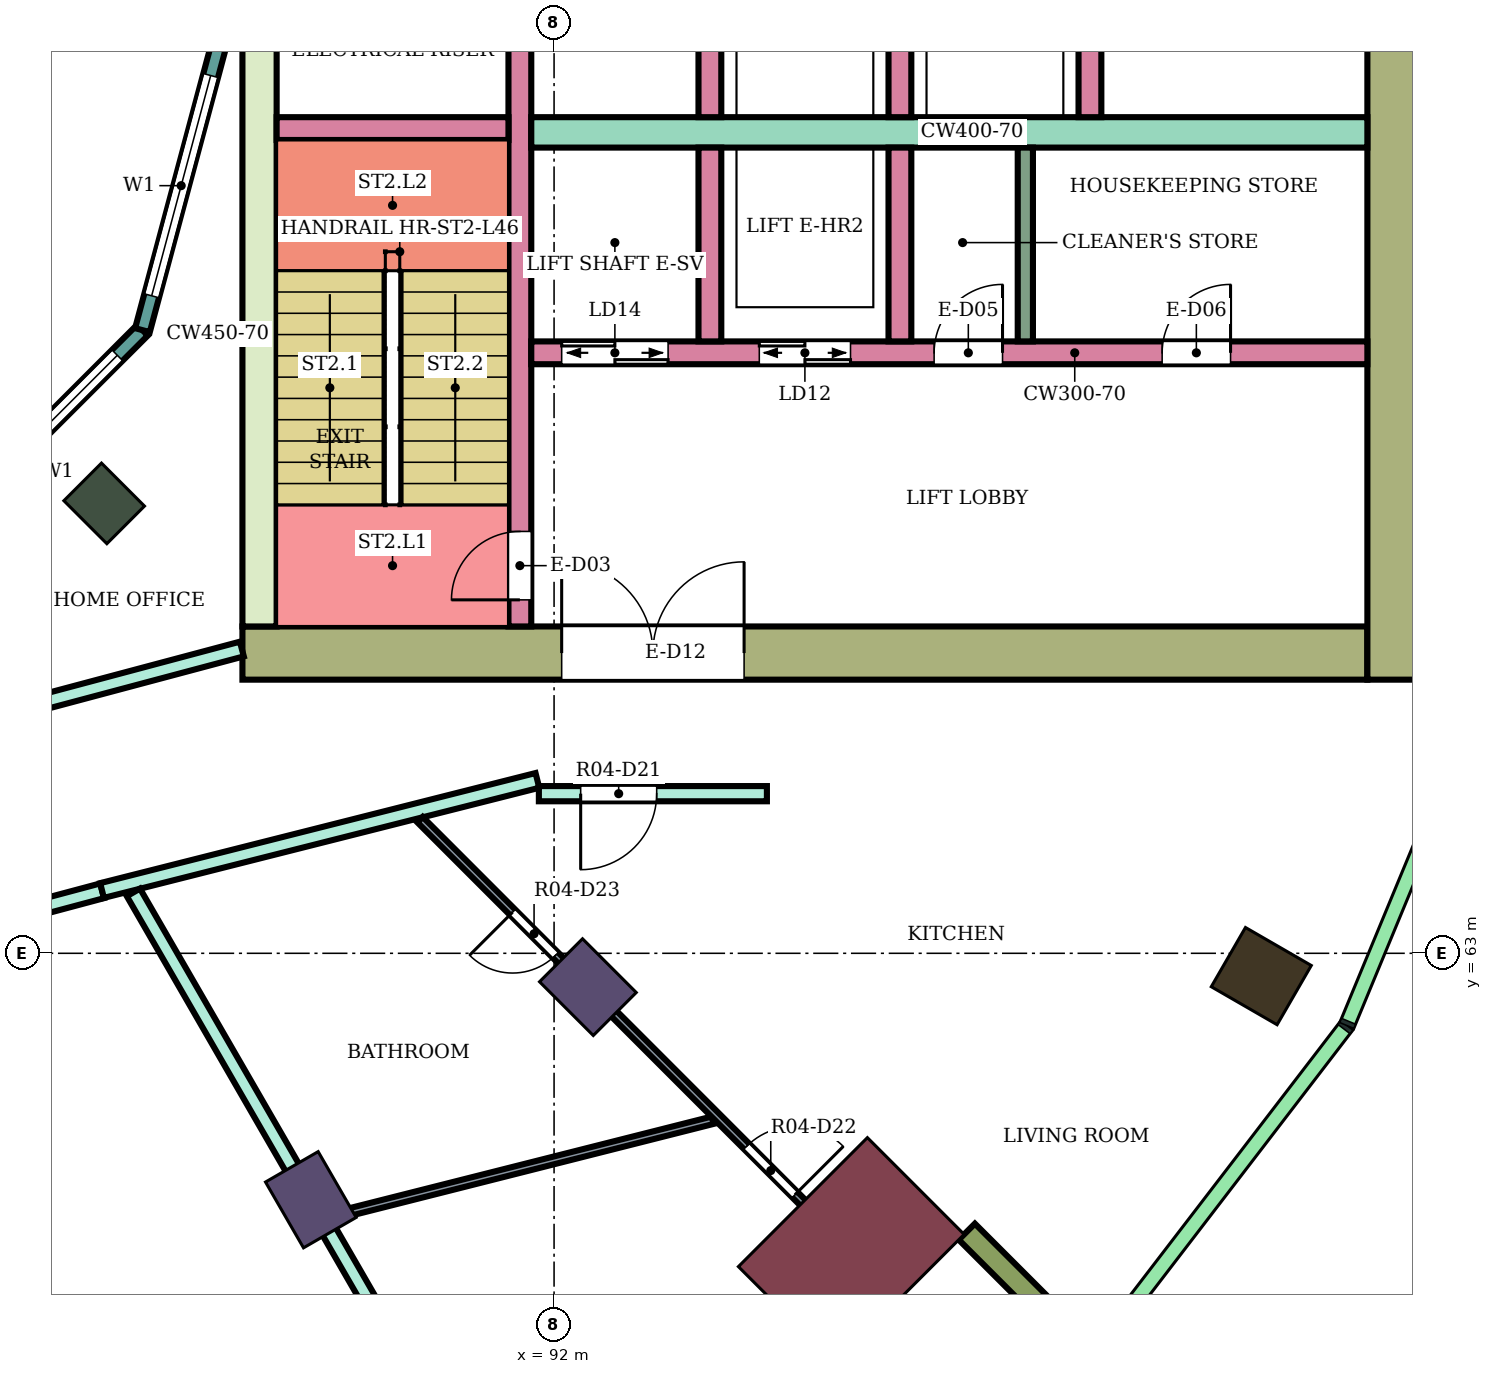
"""IFC4 building model, lengths in metres.
Left out: names, types, materials, properties, quantities, classifications, styles, units other than length and angle.
Written with IfcOpenShell. Run it as: python <this file> out.ifc"""

import sys

from ifc_helpers import new_model, si_unit, direction, frame, frame_2d, origin, origin_2d, place, context, subcontext, project, spatial, rectangle, extrude, element, fill, save


model = new_model("IFC4")
c1 = context("Model", 3, precision=1e-05, world=origin(), true_north=direction((0.0, 1.0)))
c2 = subcontext(c1, "Body", "Model", "MODEL_VIEW")
j1 = project(units=[si_unit("LENGTHUNIT", "METRE"), si_unit("PLANEANGLEUNIT", "RADIAN")], contexts=[c1])
p1 = place(None, origin())
s1 = spatial("IfcSite", under=j1, at=p1, CompositionType="ELEMENT")
p2 = place(p1, origin())
s2 = spatial("IfcBuilding", under=s1, at=p2, CompositionType="ELEMENT")
p3 = place(p2, frame((0.0, 0.0, 198.7)))
s3 = spatial("IfcBuildingStorey", under=s2, at=p3, CompositionType="ELEMENT", Elevation=198.7)
p4 = place(p3, frame((101.304, 62.7, 0.0), z_axis=(0.0, 0.0, 1.0), x_axis=(0.866025403784, -0.5, 0.0)))
e1 = element("IfcColumn", 1, at=p4, inside=s3, PredefinedType="COLUMN", context=c2, shape_type="SweptSolid", body=[
    extrude(rectangle(XDim=1.0, YDim=0.9, at=origin_2d()), origin(), (0.0, 0.0, 1.0), 4.1),
])
for number, where, z_axis, x_axis in (
    (2, (88.8, 59.758, 0.0), (0.0, 0.0, 1.0), (0.5, -0.866, 0.0)),
    (3, (92.445, 62.555, 0.0), (0.0, 0.0, 1.0), (0.707, -0.707, 0.0)),
):
    element("IfcColumn", number, at=place(p3, frame(where, z_axis=z_axis, x_axis=x_axis)), inside=s3, PredefinedType="COLUMN", context=c2, shape_type="SweptSolid", body=[
        extrude(rectangle(XDim=1.0, YDim=0.8, at=origin_2d()), origin(), (0.0, 0.0, 1.0), 4.1),
    ])
p5 = place(p3, frame((86.081, 68.919, 0.0), z_axis=(0.0, 0.0, 1.0), x_axis=(0.707106781187, -0.707106781187, 0.0)))
e4 = element("IfcColumn", 4, at=p5, inside=s3, PredefinedType="COLUMN", context=c2, shape_type="SweptSolid", body=[
    extrude(rectangle(XDim=0.8, YDim=0.7, at=origin_2d()), origin(), (0.0, 0.0, 1.0), 4.1),
])
p6 = place(p3, frame((95.91, 59.09, 0.0), z_axis=(0.0, 0.0, 1.0), x_axis=(0.707106781187, -0.707106781187, 0.0)))
e5 = element("IfcColumn", 5, at=p6, inside=s3, PredefinedType="COLUMN", context=c2, shape_type="SweptSolid", body=[
    extrude(rectangle(XDim=1.8, YDim=2.4, at=origin_2d()), origin(), (0.0, 0.0, 1.0), 4.1),
])
p7 = place(p3, frame((87.9, 66.95, 0.0), z_axis=(0.0, 0.0, 1.0), x_axis=(1.0, 0.0, 0.0)))
e6 = element("IfcWall", 6, at=p7, inside=s3, PredefinedType="SHEAR", context=c2, shape_type="SweptSolid", body=[
    extrude(rectangle(XDim=14.8, YDim=0.7, at=frame_2d((7.4, 0.0))), origin(), (0.0, 0.0, 1.0), 3.78),
])
p8 = place(p7, frame((4.2, 0.0, 0.0)))
e7 = element("IfcOpeningElement", 7, at=p8, cuts=e6, PredefinedType="OPENING", context=c2, shape_type="SweptSolid", body=[
    extrude(rectangle(XDim=2.4, YDim=2.4, at=frame_2d((1.2, 1.2))), frame((0.0, 0.36, 0.0), z_axis=(0.0, -1.0, 0.0), x_axis=(1.0, 0.0, 0.0)), (0.0, 0.0, 1.0), 0.72),
])
p9 = place(p3, frame((88.125, 67.3, 0.0), z_axis=(0.0, 0.0, 1.0), x_axis=(0.0, 1.0, 0.0)))
e8 = element("IfcWall", 8, at=p9, inside=s3, PredefinedType="SHEAR", context=c2, shape_type="SweptSolid", body=[
    extrude(rectangle(XDim=7.7, YDim=0.45, at=frame_2d((3.85, 0.0))), origin(), (0.0, 0.0, 1.0), 3.78),
])
p10 = place(p3, frame((103.05, 66.6, 0.0), z_axis=(0.0, 0.0, 1.0), x_axis=(0.0, 1.0, 0.0)))
e9 = element("IfcWall", 9, at=p10, inside=s3, PredefinedType="SHEAR", context=c2, shape_type="SweptSolid", body=[
    extrude(rectangle(XDim=16.8, YDim=0.7, at=frame_2d((8.4, 0.0))), origin(), (0.0, 0.0, 1.0), 3.78),
])
p11 = place(p3, frame((91.55, 67.3, 0.0), z_axis=(0.0, 0.0, 1.0), x_axis=(0.0, 1.0, 0.0)))
e10 = element("IfcWall", 10, at=p11, inside=s3, PredefinedType="SHEAR", context=c2, shape_type="SweptSolid", body=[
    extrude(rectangle(XDim=7.7, YDim=0.3, at=frame_2d((3.85, 0.0))), origin(), (0.0, 0.0, 1.0), 3.78),
])
p12 = place(p11, frame((0.35, 0.0, 0.0)))
e11 = element("IfcOpeningElement", 11, at=p12, cuts=e10, PredefinedType="OPENING", context=c2, shape_type="SweptSolid", body=[
    extrude(rectangle(XDim=0.9, YDim=2.1, at=frame_2d((0.45, 1.05))), frame((0.0, 0.16, 0.0), z_axis=(0.0, -1.0, 0.0), x_axis=(1.0, 0.0, 0.0)), (0.0, 0.0, 1.0), 0.32),
])
p13 = place(p3, frame((88.35, 73.85, 0.0), z_axis=(0.0, 0.0, 1.0), x_axis=(1.0, 0.0, 0.0)))
e12 = element("IfcWall", 12, at=p13, inside=s3, PredefinedType="SHEAR", context=c2, shape_type="SweptSolid", body=[
    extrude(rectangle(XDim=3.05, YDim=0.3, at=frame_2d((1.525, 0.0))), origin(), (0.0, 0.0, 1.0), 3.78),
])
p14 = place(p3, frame((91.7, 73.8, 0.0), z_axis=(0.0, 0.0, 1.0), x_axis=(1.0, 0.0, 0.0)))
e13 = element("IfcWall", 13, at=p14, inside=s3, PredefinedType="SHEAR", context=c2, shape_type="SweptSolid", body=[
    extrude(rectangle(XDim=11.0, YDim=0.4, at=frame_2d((5.5, 0.0))), origin(), (0.0, 0.0, 1.0), 3.78),
])
p15 = place(p3, frame((91.7, 70.9, 0.0), z_axis=(0.0, 0.0, 1.0), x_axis=(1.0, 0.0, 0.0)))
e14 = element("IfcWall", 14, at=p15, inside=s3, PredefinedType="SHEAR", context=c2, shape_type="SweptSolid", body=[
    extrude(rectangle(XDim=11.0, YDim=0.3, at=frame_2d((5.5, 0.0))), origin(), (0.0, 0.0, 1.0), 3.78),
])
p16 = place(p15, frame((0.4, 0.0, 0.0)))
e15 = element("IfcOpeningElement", 15, at=p16, cuts=e14, PredefinedType="OPENING", context=c2, shape_type="SweptSolid", body=[
    extrude(rectangle(XDim=1.4, YDim=2.1, at=frame_2d((0.7, 1.05))), frame((0.0, 0.16, 0.0), z_axis=(0.0, -1.0, 0.0), x_axis=(1.0, 0.0, 0.0)), (0.0, 0.0, 1.0), 0.32),
])
p17 = place(p15, frame((3.0, 0.0, 0.0)))
e16 = element("IfcOpeningElement", 16, at=p17, cuts=e14, PredefinedType="OPENING", context=c2, shape_type="SweptSolid", body=[
    extrude(rectangle(XDim=1.2, YDim=2.1, at=frame_2d((0.6, 1.05))), frame((0.0, 0.16, 0.0), z_axis=(0.0, -1.0, 0.0), x_axis=(1.0, 0.0, 0.0)), (0.0, 0.0, 1.0), 0.32),
])
p18 = place(p15, frame((5.3, 0.0, 0.0)))
e17 = element("IfcOpeningElement", 17, at=p18, cuts=e14, PredefinedType="OPENING", context=c2, shape_type="SweptSolid", body=[
    extrude(rectangle(XDim=0.9, YDim=2.1, at=frame_2d((0.45, 1.05))), frame((0.0, 0.16, 0.0), z_axis=(0.0, -1.0, 0.0), x_axis=(1.0, 0.0, 0.0)), (0.0, 0.0, 1.0), 0.32),
])
p19 = place(p15, frame((8.3, 0.0, 0.0)))
e18 = element("IfcOpeningElement", 18, at=p19, cuts=e14, PredefinedType="OPENING", context=c2, shape_type="SweptSolid", body=[
    extrude(rectangle(XDim=0.9, YDim=2.1, at=frame_2d((0.45, 1.05))), frame((0.0, 0.16, 0.0), z_axis=(0.0, -1.0, 0.0), x_axis=(1.0, 0.0, 0.0)), (0.0, 0.0, 1.0), 0.32),
])
for number, where, z_axis, x_axis in (
    (19, (94.05, 74.0, 0.0), (0.0, 0.0, 1.0), (0.0, 1.0, 0.0)),
    (20, (96.55, 74.0, 0.0), (0.0, 0.0, 1.0), (0.0, 1.0, 0.0)),
    (21, (99.05, 74.0, 0.0), (0.0, 0.0, 1.0), (0.0, 1.0, 0.0)),
    (22, (94.05, 71.05, 0.0), (0.0, 0.0, 1.0), (0.0, 1.0, 0.0)),
    (23, (96.55, 71.05, 0.0), (0.0, 0.0, 1.0), (0.0, 1.0, 0.0)),
):
    element("IfcWall", number, at=place(p3, frame(where, z_axis=z_axis, x_axis=x_axis)), inside=s3, PredefinedType="SHEAR", context=c2, shape_type="SweptSolid", body=[
        extrude(rectangle(XDim=2.55, YDim=0.3, at=frame_2d((1.275, 0.0))), origin(), (0.0, 0.0, 1.0), 3.78),
    ])
p20 = place(p3, frame((97.43, 59.338, 0.0), z_axis=(0.0, 0.0, 1.0), x_axis=(0.707106781187, -0.707106781187, 0.0)))
e24 = element("IfcWall", 24, at=p20, inside=s3, PredefinedType="NOTDEFINED", context=c2, shape_type="SweptSolid", body=[
    extrude(rectangle(XDim=2.416, YDim=0.3, at=frame_2d((1.208, 0.0))), origin(), (0.0, 0.0, 1.0), 4.1),
])
p21 = place(p3, frame((83.802, 68.415, 0.0), z_axis=(0.0, 0.0, 1.0), x_axis=(0.707106781187, 0.707106781187, 0.0)))
e25 = element("IfcWall", 25, at=p21, inside=s3, PredefinedType="NOTDEFINED", context=c2, shape_type="SweptSolid", body=[
    extrude(rectangle(XDim=3.936, YDim=0.2, at=frame_2d((1.968, 0.0))), origin(), (0.0, 0.0, 1.0), 4.1),
])
p22 = place(p21, frame((0.468, 0.0, 0.9)))
e26 = element("IfcOpeningElement", 26, at=p22, cuts=e25, PredefinedType="OPENING", context=c2, shape_type="SweptSolid", body=[
    extrude(rectangle(XDim=3.0, YDim=2.3, at=frame_2d((1.5, 1.15))), frame((0.0, 0.11, 0.0), z_axis=(0.0, -1.0, 0.0), x_axis=(1.0, 0.0, 0.0)), (0.0, 0.0, 1.0), 0.22),
])
p23 = place(p3, frame((86.585, 71.198, 0.0), z_axis=(0.0, 0.0, 1.0), x_axis=(0.258789828301, 0.965933654434, 0.0)))
e27 = element("IfcWall", 27, at=p23, inside=s3, PredefinedType="NOTDEFINED", context=c2, shape_type="SweptSolid", body=[
    extrude(rectangle(XDim=3.936, YDim=0.2, at=frame_2d((1.968, 0.0))), origin(), (0.0, 0.0, 1.0), 4.1),
])
p24 = place(p23, frame((0.468, 0.0, 0.9)))
e28 = element("IfcOpeningElement", 28, at=p24, cuts=e27, PredefinedType="OPENING", context=c2, shape_type="SweptSolid", body=[
    extrude(rectangle(XDim=3.0, YDim=2.3, at=frame_2d((1.5, 1.15))), frame((0.0, 0.11, 0.0), z_axis=(0.0, -1.0, 0.0), x_axis=(1.0, 0.0, 0.0)), (0.0, 0.0, 1.0), 0.22),
])
p25 = place(p3, frame((80.048, 62.217, 0.0), z_axis=(0.0, 0.0, 1.0), x_axis=(0.966097920642, 0.258175923996, 0.0)))
e29 = element("IfcWall", 29, at=p25, inside=s3, PredefinedType="PARTITIONING", context=c2, shape_type="SweptSolid", body=[
    extrude(rectangle(XDim=6.217, YDim=0.2, at=frame_2d((3.108, 0.0))), origin(), (0.0, 0.0, 1.0), 3.65),
])
p26 = place(p25, frame((3.792, 0.0, 0.0)))
e30 = element("IfcOpeningElement", 30, at=p26, cuts=e29, PredefinedType="OPENING", context=c2, shape_type="SweptSolid", body=[
    extrude(rectangle(XDim=1.0, YDim=2.1, at=frame_2d((0.5, 1.05))), frame((0.0, 0.11, 0.0), z_axis=(0.0, -1.0, 0.0), x_axis=(1.0, 0.0, 0.0)), (0.0, 0.0, 1.0), 0.22),
])
p27 = place(p3, frame((80.0, 64.898, 0.0), z_axis=(0.0, 0.0, 1.0), x_axis=(0.966236923997, 0.25765520896, 0.0)))
e31 = element("IfcWall", 31, at=p27, inside=s3, PredefinedType="PARTITIONING", context=c2, shape_type="SweptSolid", body=[
    extrude(rectangle(XDim=8.168, YDim=0.2, at=frame_2d((4.084, 0.0))), origin(), (0.0, 0.0, 1.0), 3.65),
])
p28 = place(p27, frame((1.893, 0.0, 0.0)))
e32 = element("IfcOpeningElement", 32, at=p28, cuts=e31, PredefinedType="OPENING", context=c2, shape_type="SweptSolid", body=[
    extrude(rectangle(XDim=1.8, YDim=2.1, at=frame_2d((0.9, 1.05))), frame((0.0, 0.11, 0.0), z_axis=(0.0, -1.0, 0.0), x_axis=(1.0, 0.0, 0.0)), (0.0, 0.0, 1.0), 0.22),
])
p29 = place(p3, frame((86.053, 63.826, 0.0), z_axis=(0.0, 0.0, 1.0), x_axis=(0.969490004987, 0.245130843083, 0.0)))
e33 = element("IfcWall", 33, at=p29, inside=s3, PredefinedType="PARTITIONING", context=c2, shape_type="SweptSolid", body=[
    extrude(rectangle(XDim=5.908, YDim=0.2, at=frame_2d((2.954, 0.0))), origin(), (0.0, 0.0, 1.0), 3.65),
])
p30 = place(p3, frame((86.466, 63.801, 0.0), z_axis=(0.0, 0.0, 1.0), x_axis=(0.499937082171, -0.866061726362, 0.0)))
e34 = element("IfcWall", 34, at=p30, inside=s3, PredefinedType="PARTITIONING", context=c2, shape_type="SweptSolid", body=[
    extrude(rectangle(XDim=12.866, YDim=0.2, at=frame_2d((6.433, 0.0))), origin(), (0.0, 0.0, 1.0), 3.65),
])
p31 = place(p3, frame((91.8, 65.1, 0.0), z_axis=(0.0, 0.0, 1.0), x_axis=(1.0, 0.0, 0.0)))
e35 = element("IfcWall", 35, at=p31, inside=s3, PredefinedType="PARTITIONING", context=c2, shape_type="SweptSolid", body=[
    extrude(rectangle(XDim=3.0, YDim=0.2, at=frame_2d((1.5, 0.0))), origin(), (0.0, 0.0, 1.0), 3.65),
])
p32 = place(p31, frame((0.55, 0.0, 0.0)))
e36 = element("IfcOpeningElement", 36, at=p32, cuts=e35, PredefinedType="OPENING", context=c2, shape_type="SweptSolid", body=[
    extrude(rectangle(XDim=1.0, YDim=2.1, at=frame_2d((0.5, 1.05))), frame((0.0, 0.11, 0.0), z_axis=(0.0, -1.0, 0.0), x_axis=(1.0, 0.0, 0.0)), (0.0, 0.0, 1.0), 0.22),
])
p33 = place(p3, frame((83.228, 62.955, 0.0), z_axis=(0.0, 0.0, 1.0), x_axis=(0.258737611245, -0.965947642746, 0.0)))
e37 = element("IfcWall", 37, at=p33, inside=s3, PredefinedType="PARTITIONING", context=c2, shape_type="SweptSolid", body=[
    extrude(rectangle(XDim=13.328, YDim=0.1, at=frame_2d((6.664, 0.0))), origin(), (0.0, 0.0, 1.0), 3.65),
])
p34 = place(p33, frame((9.684, 0.0, 0.0)))
e38 = element("IfcOpeningElement", 38, at=p34, cuts=e37, PredefinedType="OPENING", context=c2, shape_type="SweptSolid", body=[
    extrude(rectangle(XDim=0.9, YDim=2.1, at=frame_2d((0.45, 1.05))), frame((0.0, 0.06, 0.0), z_axis=(0.0, -1.0, 0.0), x_axis=(1.0, 0.0, 0.0)), (0.0, 0.0, 1.0), 0.12),
])
p35 = place(p33, frame((2.65, 0.0, 0.0)))
e39 = element("IfcOpeningElement", 39, at=p35, cuts=e37, PredefinedType="OPENING", context=c2, shape_type="SweptSolid", body=[
    extrude(rectangle(XDim=0.8, YDim=2.1, at=frame_2d((0.4, 1.05))), frame((0.0, 0.06, 0.0), z_axis=(0.0, -1.0, 0.0), x_axis=(1.0, 0.0, 0.0)), (0.0, 0.0, 1.0), 0.12),
])
p36 = place(p3, frame((89.054, 59.531, 0.0), z_axis=(0.0, 0.0, 1.0), x_axis=(0.969472150829, 0.245201445279, 0.0)))
e40 = element("IfcWall", 40, at=p36, inside=s3, PredefinedType="PARTITIONING", context=c2, shape_type="SweptSolid", body=[
    extrude(rectangle(XDim=5.191, YDim=0.1, at=frame_2d((2.596, 0.0))), origin(), (0.0, 0.0, 1.0), 3.65),
])
p37 = place(p3, frame((90.236, 64.758, 0.0), z_axis=(0.0, 0.0, 1.0), x_axis=(0.706952774706, -0.707260754132, 0.0)))
e41 = element("IfcWall", 41, at=p37, inside=s3, PredefinedType="PARTITIONING", context=c2, shape_type="SweptSolid", body=[
    extrude(rectangle(XDim=8.72, YDim=0.1, at=frame_2d((4.36, 0.0))), origin(), (0.0, 0.0, 1.0), 3.65),
])
p38 = place(p37, frame((6.077, 0.0, 0.0)))
e42 = element("IfcOpeningElement", 42, at=p38, cuts=e41, PredefinedType="OPENING", context=c2, shape_type="SweptSolid", body=[
    extrude(rectangle(XDim=0.9, YDim=2.1, at=frame_2d((0.45, 1.05))), frame((0.0, 0.06, 0.0), z_axis=(0.0, -1.0, 0.0), x_axis=(1.0, 0.0, 0.0)), (0.0, 0.0, 1.0), 0.12),
])
p39 = place(p37, frame((1.722, 0.0, 0.0)))
e43 = element("IfcOpeningElement", 43, at=p39, cuts=e41, PredefinedType="OPENING", context=c2, shape_type="SweptSolid", body=[
    extrude(rectangle(XDim=0.8, YDim=2.1, at=frame_2d((0.4, 1.05))), frame((0.0, 0.06, 0.0), z_axis=(0.0, -1.0, 0.0), x_axis=(1.0, 0.0, 0.0)), (0.0, 0.0, 1.0), 0.12),
])
p40 = place(p3, frame((98.2, 71.05, 0.0), z_axis=(0.0, 0.0, 1.0), x_axis=(0.0, 1.0, 0.0)))
e44 = element("IfcWall", 44, at=p40, inside=s3, PredefinedType="PARTITIONING", context=c2, shape_type="SweptSolid", body=[
    extrude(rectangle(XDim=2.55, YDim=0.2, at=frame_2d((1.275, 0.0))), origin(), (0.0, 0.0, 1.0), 3.78),
])
p41 = place(p22, origin())
e45 = element("IfcWindow", 45, at=p41, inside=s3, PartitioningType="SINGLE_PANEL", PredefinedType="WINDOW", context=c2, shape_type="SweptSolid", body=[
    extrude(rectangle(XDim=3.0, YDim=2.3, at=frame_2d((1.5, 1.15))), frame((0.0, 0.03, 0.0), z_axis=(0.0, -1.0, 0.0), x_axis=(1.0, 0.0, 0.0)), (0.0, 0.0, 1.0), 0.06),
])
fill(e26, e45)
p42 = place(p24, origin())
e46 = element("IfcWindow", 46, at=p42, inside=s3, PartitioningType="SINGLE_PANEL", PredefinedType="WINDOW", context=c2, shape_type="SweptSolid", body=[
    extrude(rectangle(XDim=3.0, YDim=2.3, at=frame_2d((1.5, 1.15))), frame((0.0, 0.03, 0.0), z_axis=(0.0, -1.0, 0.0), x_axis=(1.0, 0.0, 0.0)), (0.0, 0.0, 1.0), 0.06),
])
fill(e28, e46)
p43 = place(p32, frame((1.0, 0.0, 0.0), z_axis=(0.0, 0.0, 1.0), x_axis=(-1.0, 0.0, 0.0)))
e47 = element("IfcDoor", 47, at=p43, inside=s3, OperationType="SINGLE_SWING_RIGHT", PredefinedType="DOOR", context=c2, shape_type="SweptSolid", body=[
    extrude(rectangle(XDim=1.0, YDim=2.1, at=frame_2d((0.5, 1.05))), frame((0.0, 0.025, 0.0), z_axis=(0.0, -1.0, 0.0), x_axis=(1.0, 0.0, 0.0)), (0.0, 0.0, 1.0), 0.05),
])
fill(e36, e47)
p44 = place(p38, origin())
e48 = element("IfcDoor", 48, at=p44, inside=s3, OperationType="SINGLE_SWING_RIGHT", PredefinedType="DOOR", context=c2, shape_type="SweptSolid", body=[
    extrude(rectangle(XDim=0.9, YDim=2.1, at=frame_2d((0.45, 1.05))), frame((0.0, 0.025, 0.0), z_axis=(0.0, -1.0, 0.0), x_axis=(1.0, 0.0, 0.0)), (0.0, 0.0, 1.0), 0.05),
])
fill(e42, e48)
p45 = place(p39, frame((0.8, 0.0, 0.0), z_axis=(0.0, 0.0, 1.0), x_axis=(-1.0, 0.0, 0.0)))
e49 = element("IfcDoor", 49, at=p45, inside=s3, OperationType="SINGLE_SWING_RIGHT", PredefinedType="DOOR", context=c2, shape_type="SweptSolid", body=[
    extrude(rectangle(XDim=0.8, YDim=2.1, at=frame_2d((0.4, 1.05))), frame((0.0, 0.025, 0.0), z_axis=(0.0, -1.0, 0.0), x_axis=(1.0, 0.0, 0.0)), (0.0, 0.0, 1.0), 0.05),
])
fill(e43, e49)
p46 = place(p12, origin())
e50 = element("IfcDoor", 50, at=p46, inside=s3, OperationType="SINGLE_SWING_LEFT", PredefinedType="DOOR", context=c2, shape_type="SweptSolid", body=[
    extrude(rectangle(XDim=0.9, YDim=2.1, at=frame_2d((0.45, 1.05))), frame((0.0, 0.025, 0.0), z_axis=(0.0, -1.0, 0.0), x_axis=(1.0, 0.0, 0.0)), (0.0, 0.0, 1.0), 0.05),
])
fill(e11, e50)
p47 = place(p16, origin())
e51 = element("IfcDoor", 51, at=p47, inside=s3, OperationType="DOUBLE_DOOR_SLIDING", PredefinedType="DOOR", context=c2, shape_type="SweptSolid", body=[
    extrude(rectangle(XDim=1.4, YDim=2.1, at=frame_2d((0.7, 1.05))), frame((0.0, 0.025, 0.0), z_axis=(0.0, -1.0, 0.0), x_axis=(1.0, 0.0, 0.0)), (0.0, 0.0, 1.0), 0.05),
])
fill(e15, e51)
p48 = place(p17, origin())
e52 = element("IfcDoor", 52, at=p48, inside=s3, OperationType="DOUBLE_DOOR_SLIDING", PredefinedType="DOOR", context=c2, shape_type="SweptSolid", body=[
    extrude(rectangle(XDim=1.2, YDim=2.1, at=frame_2d((0.6, 1.05))), frame((0.0, 0.025, 0.0), z_axis=(0.0, -1.0, 0.0), x_axis=(1.0, 0.0, 0.0)), (0.0, 0.0, 1.0), 0.05),
])
fill(e16, e52)
p49 = place(p18, origin())
e53 = element("IfcDoor", 53, at=p49, inside=s3, OperationType="SINGLE_SWING_RIGHT", PredefinedType="DOOR", context=c2, shape_type="SweptSolid", body=[
    extrude(rectangle(XDim=0.9, YDim=2.1, at=frame_2d((0.45, 1.05))), frame((0.0, 0.025, 0.0), z_axis=(0.0, -1.0, 0.0), x_axis=(1.0, 0.0, 0.0)), (0.0, 0.0, 1.0), 0.05),
])
fill(e17, e53)
p50 = place(p19, origin())
e54 = element("IfcDoor", 54, at=p50, inside=s3, OperationType="SINGLE_SWING_RIGHT", PredefinedType="DOOR", context=c2, shape_type="SweptSolid", body=[
    extrude(rectangle(XDim=0.9, YDim=2.1, at=frame_2d((0.45, 1.05))), frame((0.0, 0.025, 0.0), z_axis=(0.0, -1.0, 0.0), x_axis=(1.0, 0.0, 0.0)), (0.0, 0.0, 1.0), 0.05),
])
fill(e18, e54)
p51 = place(p8, origin())
e55 = element("IfcDoor", 55, at=p51, inside=s3, OperationType="DOUBLE_DOOR_SINGLE_SWING", PredefinedType="DOOR", context=c2, shape_type="SweptSolid", body=[
    extrude(rectangle(XDim=2.4, YDim=2.4, at=frame_2d((1.2, 1.2))), frame((0.0, 0.025, 0.0), z_axis=(0.0, -1.0, 0.0), x_axis=(1.0, 0.0, 0.0)), (0.0, 0.0, 1.0), 0.05),
])
fill(e7, e55)
save(model, sys.argv[1])
